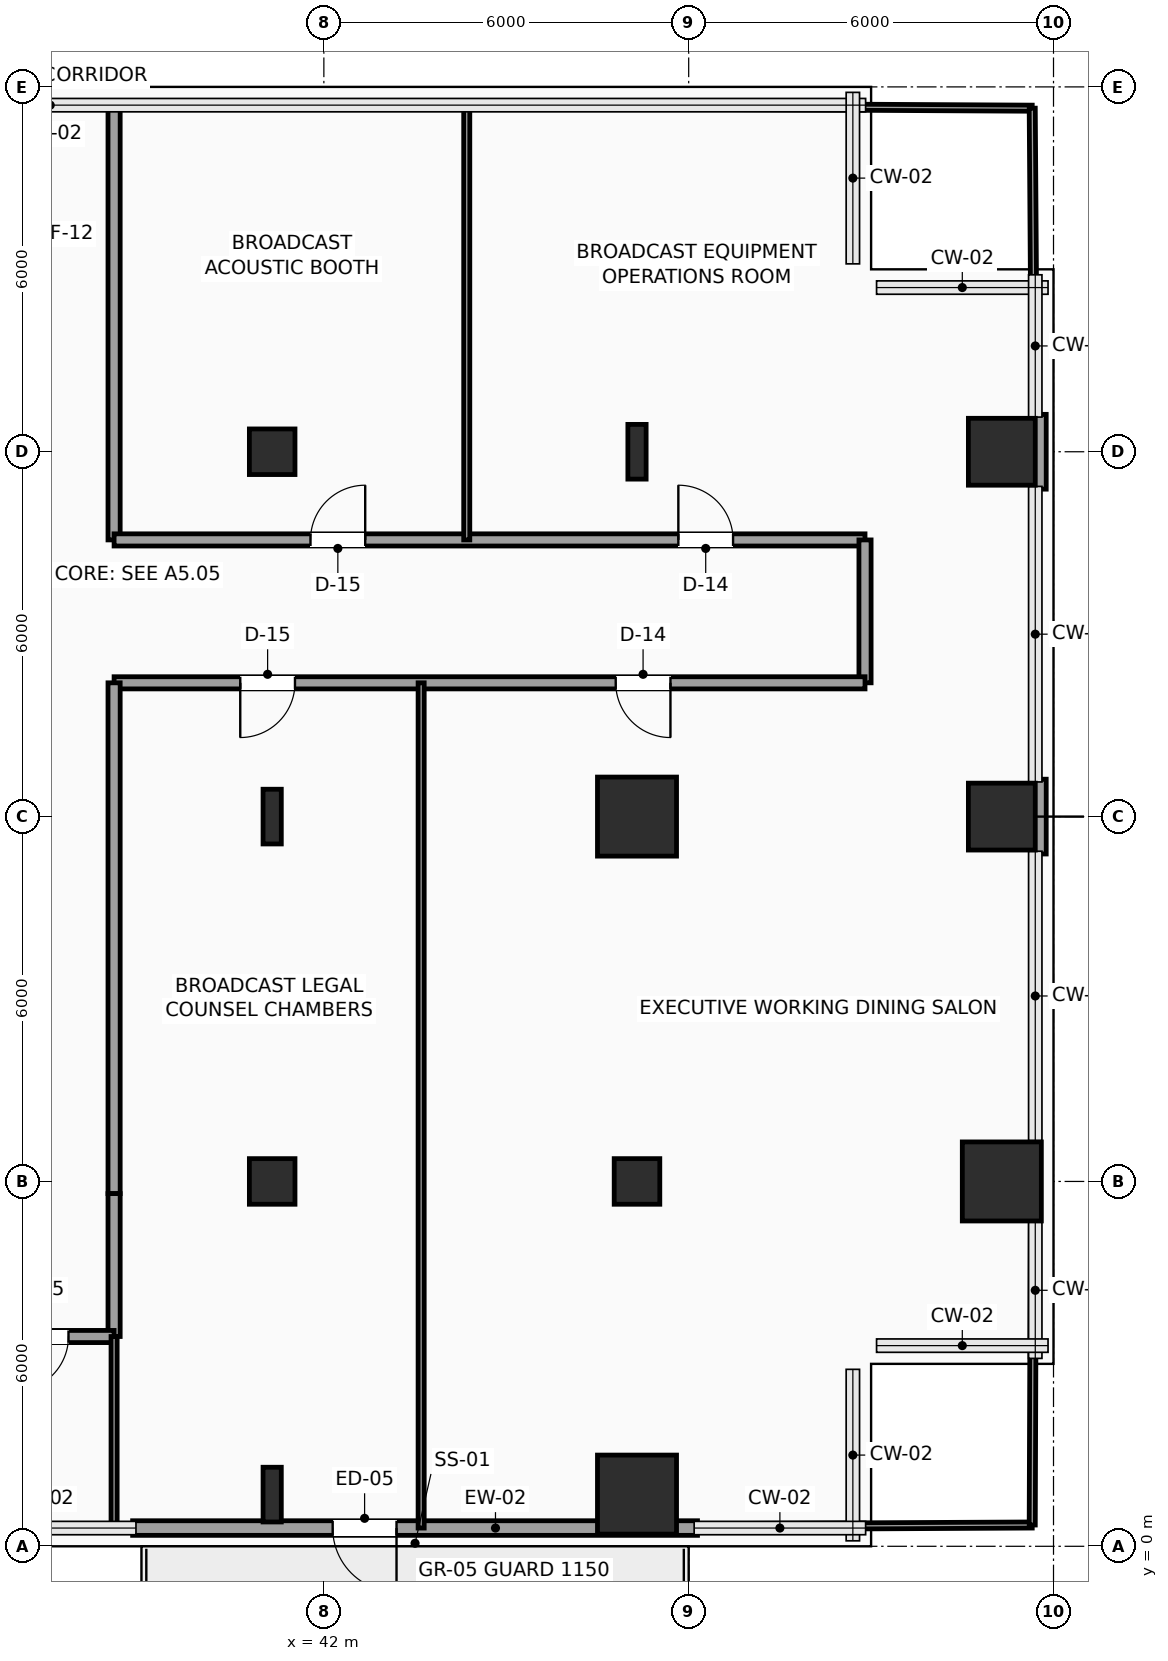
"""IFC4 building model, lengths in metres.
Left out: names, types, materials, properties, quantities, classifications, styles, units other than length and angle.
Written with IfcOpenShell. Run it as: python <this file> out.ifc"""

import sys

from ifc_helpers import new_model, si_unit, direction, frame, frame_2d, origin, origin_2d, place, context, subcontext, project, spatial, rectangle, hollow_rectangle, i_section, extrude, element, fill, save


model = new_model("IFC4")
c1 = context("Model", 3, precision=1e-05, world=origin(), true_north=direction((0.0, 1.0)))
c2 = subcontext(c1, "Body", "Model", "MODEL_VIEW")
j1 = project(units=[si_unit("LENGTHUNIT", "METRE"), si_unit("PLANEANGLEUNIT", "RADIAN")], contexts=[c1])
p1 = place(None, origin())
s1 = spatial("IfcSite", under=j1, at=p1, CompositionType="ELEMENT")
p2 = place(p1, origin())
s2 = spatial("IfcBuilding", under=s1, at=p2, CompositionType="ELEMENT")
p3 = place(p2, frame((0.0, 0.0, 90.9)))
s3 = spatial("IfcBuildingStorey", under=s2, at=p3, CompositionType="ELEMENT", Elevation=90.9)
p4 = place(p3, frame((41.15, 0.85, 0.0), z_axis=(0.0, 0.0, 1.0), x_axis=(1.0, 0.0, 0.0)))
e1 = element("IfcColumn", 1, at=p4, inside=s3, PredefinedType="COLUMN", context=c2, shape_type="SweptSolid", body=[
    extrude(i_section(OverallWidth=0.3, OverallDepth=0.9, WebThickness=0.019, FlangeThickness=0.035, FilletRadius=0.03, at=origin_2d()), origin(), (0.0, 0.0, 1.0), 3.9),
])
p5 = place(p3, frame((41.15, 6.0, 0.0), z_axis=(0.0, 0.0, 1.0), x_axis=(1.0, 0.0, 0.0)))
e2 = element("IfcColumn", 2, at=p5, inside=s3, PredefinedType="COLUMN", context=c2, shape_type="SweptSolid", body=[
    extrude(hollow_rectangle(XDim=0.75, YDim=0.75, WallThickness=0.035, InnerFilletRadius=0.035, OuterFilletRadius=0.05, at=origin_2d()), origin(), (0.0, 0.0, 1.0), 3.9),
])
p6 = place(p3, frame((41.15, 12.0, 0.0), z_axis=(0.0, 0.0, 1.0), x_axis=(1.0, 0.0, 0.0)))
e3 = element("IfcColumn", 3, at=p6, inside=s3, PredefinedType="COLUMN", context=c2, shape_type="SweptSolid", body=[
    extrude(i_section(OverallWidth=0.3, OverallDepth=0.9, WebThickness=0.019, FlangeThickness=0.035, FilletRadius=0.03, at=origin_2d()), origin(), (0.0, 0.0, 1.0), 3.9),
])
p7 = place(p3, frame((41.15, 18.0, 0.0), z_axis=(0.0, 0.0, 1.0), x_axis=(1.0, 0.0, 0.0)))
e4 = element("IfcColumn", 4, at=p7, inside=s3, PredefinedType="COLUMN", context=c2, shape_type="SweptSolid", body=[
    extrude(hollow_rectangle(XDim=0.75, YDim=0.75, WallThickness=0.035, InnerFilletRadius=0.035, OuterFilletRadius=0.05, at=origin_2d()), origin(), (0.0, 0.0, 1.0), 3.9),
])
p8 = place(p3, frame((47.15, 0.85, 0.0), z_axis=(0.0, 0.0, 1.0), x_axis=(1.0, 0.0, 0.0)))
e5 = element("IfcColumn", 5, at=p8, inside=s3, PredefinedType="COLUMN", context=c2, shape_type="SweptSolid", body=[
    extrude(rectangle(XDim=1.3, YDim=1.3, at=origin_2d()), origin(), (0.0, 0.0, 1.0), 3.9),
])
p9 = place(p3, frame((47.15, 6.0, 0.0), z_axis=(0.0, 0.0, 1.0), x_axis=(1.0, 0.0, 0.0)))
e6 = element("IfcColumn", 6, at=p9, inside=s3, PredefinedType="COLUMN", context=c2, shape_type="SweptSolid", body=[
    extrude(hollow_rectangle(XDim=0.75, YDim=0.75, WallThickness=0.035, InnerFilletRadius=0.035, OuterFilletRadius=0.05, at=origin_2d()), origin(), (0.0, 0.0, 1.0), 3.9),
])
p10 = place(p3, frame((47.15, 12.0, 0.0), z_axis=(0.0, 0.0, 1.0), x_axis=(1.0, 0.0, 0.0)))
e7 = element("IfcColumn", 7, at=p10, inside=s3, PredefinedType="COLUMN", context=c2, shape_type="SweptSolid", body=[
    extrude(rectangle(XDim=1.3, YDim=1.3, at=origin_2d()), origin(), (0.0, 0.0, 1.0), 3.9),
])
p11 = place(p3, frame((47.15, 18.0, 0.0), z_axis=(0.0, 0.0, 1.0), x_axis=(1.0, 0.0, 0.0)))
e8 = element("IfcColumn", 8, at=p11, inside=s3, PredefinedType="COLUMN", context=c2, shape_type="SweptSolid", body=[
    extrude(i_section(OverallWidth=0.3, OverallDepth=0.9, WebThickness=0.019, FlangeThickness=0.035, FilletRadius=0.03, at=origin_2d()), origin(), (0.0, 0.0, 1.0), 3.9),
])
p12 = place(p3, frame((53.15, 6.0, 0.0), z_axis=(0.0, 0.0, 1.0), x_axis=(1.0, 0.0, 0.0)))
e9 = element("IfcColumn", 9, at=p12, inside=s3, PredefinedType="COLUMN", context=c2, shape_type="SweptSolid", body=[
    extrude(rectangle(XDim=1.3, YDim=1.3, at=origin_2d()), origin(), (0.0, 0.0, 1.0), 3.9),
])
for number, where, z_axis, x_axis in (
    (10, (53.15, 12.0, 0.0), (0.0, 0.0, 1.0), (1.0, 0.0, 0.0)),
    (11, (53.15, 18.0, 0.0), (0.0, 0.0, 1.0), (1.0, 0.0, 0.0)),
):
    element("IfcColumn", number, at=place(p3, frame(where, z_axis=z_axis, x_axis=x_axis)), inside=s3, PredefinedType="COLUMN", context=c2, shape_type="SweptSolid", body=[
        extrude(rectangle(XDim=1.1, YDim=1.1, at=origin_2d()), origin(), (0.0, 0.0, 1.0), 3.9),
    ])
p13 = place(p3, frame((48.145, 0.3, 0.0), z_axis=(0.0, 0.0, 1.0), x_axis=(-1.0, 0.0, 0.0)))
e12 = element("IfcWall", 12, at=p13, inside=s3, PredefinedType="SOLIDWALL", context=c2, shape_type="SweptSolid", body=[
    extrude(rectangle(XDim=9.29, YDim=0.24, at=frame_2d((4.645, 0.0))), origin(), (0.0, 0.0, 1.0), 3.575),
])
p14 = place(p13, frame((4.95, 0.0, 0.0)))
e13 = element("IfcOpeningElement", 13, at=p14, cuts=e12, PredefinedType="OPENING", context=c2, shape_type="SweptSolid", body=[
    extrude(rectangle(XDim=1.05, YDim=2.2, at=frame_2d((0.525, 1.1))), frame((0.0, 0.13, 0.0), z_axis=(0.0, -1.0, 0.0), x_axis=(1.0, 0.0, 0.0)), (0.0, 0.0, 1.0), 0.26),
])
for number, where, z_axis, x_axis in (
    (14, (53.76, 18.615, 0.0), (0.0, 0.0, 1.0), (0.0, -1.0, 0.0)),
    (15, (53.76, 12.615, 0.0), (0.0, 0.0, 1.0), (0.0, -1.0, 0.0)),
):
    element("IfcWall", number, at=place(p3, frame(where, z_axis=z_axis, x_axis=x_axis)), inside=s3, PredefinedType="SOLIDWALL", context=c2, shape_type="SweptSolid", body=[
        extrude(rectangle(XDim=1.23, YDim=0.24, at=frame_2d((0.615, 0.0))), origin(), (0.0, 0.0, 1.0), 3.575),
    ])
p15 = place(p3, frame((38.55, 23.7, 0.0), z_axis=(0.0, 0.0, 1.0), x_axis=(0.0, -1.0, 0.0)))
e16 = element("IfcWall", 16, at=p15, inside=s3, PredefinedType="SOLIDWALL", context=c2, shape_type="SweptSolid", body=[
    extrude(rectangle(XDim=7.15, YDim=0.2, at=frame_2d((3.575, 0.0))), origin(), (0.0, 0.0, 1.0), 3.575),
])
p16 = place(p3, frame((38.55, 16.55, 0.0), z_axis=(0.0, 0.0, 1.0), x_axis=(1.0, 0.0, 0.0)))
e17 = element("IfcWall", 17, at=p16, inside=s3, PredefinedType="SOLIDWALL", context=c2, shape_type="SweptSolid", body=[
    extrude(rectangle(XDim=12.35, YDim=0.2, at=frame_2d((6.175, 0.0))), origin(), (0.0, 0.0, 1.0), 3.575),
])
p17 = place(p16, frame((3.23, 0.0, 0.0)))
e18 = element("IfcOpeningElement", 18, at=p17, cuts=e17, PredefinedType="OPENING", context=c2, shape_type="SweptSolid", body=[
    extrude(rectangle(XDim=0.9, YDim=2.1, at=frame_2d((0.45, 1.05))), frame((0.0, 0.11, 0.0), z_axis=(0.0, -1.0, 0.0), x_axis=(1.0, 0.0, 0.0)), (0.0, 0.0, 1.0), 0.22),
])
p18 = place(p16, frame((9.28, 0.0, 0.0)))
e19 = element("IfcOpeningElement", 19, at=p18, cuts=e17, PredefinedType="OPENING", context=c2, shape_type="SweptSolid", body=[
    extrude(rectangle(XDim=0.9, YDim=2.1, at=frame_2d((0.45, 1.05))), frame((0.0, 0.11, 0.0), z_axis=(0.0, -1.0, 0.0), x_axis=(1.0, 0.0, 0.0)), (0.0, 0.0, 1.0), 0.22),
])
p19 = place(p3, frame((50.9, 16.55, 0.0), z_axis=(0.0, 0.0, 1.0), x_axis=(0.0, -1.0, 0.0)))
e20 = element("IfcWall", 20, at=p19, inside=s3, PredefinedType="SOLIDWALL", context=c2, shape_type="SweptSolid", body=[
    extrude(rectangle(XDim=2.35, YDim=0.2, at=frame_2d((1.175, 0.0))), origin(), (0.0, 0.0, 1.0), 3.575),
])
p20 = place(p3, frame((50.9, 14.2, 0.0), z_axis=(0.0, 0.0, 1.0), x_axis=(-1.0, 0.0, 0.0)))
e21 = element("IfcWall", 21, at=p20, inside=s3, PredefinedType="SOLIDWALL", context=c2, shape_type="SweptSolid", body=[
    extrude(rectangle(XDim=12.35, YDim=0.2, at=frame_2d((6.175, 0.0))), origin(), (0.0, 0.0, 1.0), 3.575),
])
p21 = place(p20, frame((9.375, 0.0, 0.0)))
e22 = element("IfcOpeningElement", 22, at=p21, cuts=e21, PredefinedType="OPENING", context=c2, shape_type="SweptSolid", body=[
    extrude(rectangle(XDim=0.9, YDim=2.1, at=frame_2d((0.45, 1.05))), frame((0.0, 0.11, 0.0), z_axis=(0.0, -1.0, 0.0), x_axis=(1.0, 0.0, 0.0)), (0.0, 0.0, 1.0), 0.22),
])
p22 = place(p20, frame((3.2, 0.0, 0.0)))
e23 = element("IfcOpeningElement", 23, at=p22, cuts=e21, PredefinedType="OPENING", context=c2, shape_type="SweptSolid", body=[
    extrude(rectangle(XDim=0.9, YDim=2.1, at=frame_2d((0.45, 1.05))), frame((0.0, 0.11, 0.0), z_axis=(0.0, -1.0, 0.0), x_axis=(1.0, 0.0, 0.0)), (0.0, 0.0, 1.0), 0.22),
])
p23 = place(p3, frame((38.55, 14.2, 0.0), z_axis=(0.0, 0.0, 1.0), x_axis=(0.0, -1.0, 0.0)))
e24 = element("IfcWall", 24, at=p23, inside=s3, PredefinedType="SOLIDWALL", context=c2, shape_type="SweptSolid", body=[
    extrude(rectangle(XDim=8.4, YDim=0.2, at=frame_2d((4.2, 0.0))), origin(), (0.0, 0.0, 1.0), 3.575),
])
p24 = place(p3, frame((38.55, 5.8, 0.0), z_axis=(0.0, 0.0, 1.0), x_axis=(0.0, -1.0, 0.0)))
e25 = element("IfcWall", 25, at=p24, inside=s3, PredefinedType="SOLIDWALL", context=c2, shape_type="SweptSolid", body=[
    extrude(rectangle(XDim=2.35, YDim=0.2, at=frame_2d((1.175, 0.0))), origin(), (0.0, 0.0, 1.0), 3.575),
])
p25 = place(p3, frame((38.55, 3.45, 0.0), z_axis=(0.0, 0.0, 1.0), x_axis=(-1.0, 0.0, 0.0)))
e26 = element("IfcWall", 26, at=p25, inside=s3, PredefinedType="SOLIDWALL", context=c2, shape_type="SweptSolid", body=[
    extrude(rectangle(XDim=2.4, YDim=0.2, at=frame_2d((1.2, 0.0))), origin(), (0.0, 0.0, 1.0), 3.067),
])
p26 = place(p25, frame((0.75, 0.0, 0.0)))
e27 = element("IfcOpeningElement", 27, at=p26, cuts=e26, PredefinedType="OPENING", context=c2, shape_type="SweptSolid", body=[
    extrude(rectangle(XDim=0.9, YDim=2.1, at=frame_2d((0.45, 1.05))), frame((0.0, 0.11, 0.0), z_axis=(0.0, -1.0, 0.0), x_axis=(1.0, 0.0, 0.0)), (0.0, 0.0, 1.0), 0.22),
])
p27 = place(p3, frame((43.6, 0.3, 0.0), z_axis=(0.0, 0.0, 1.0), x_axis=(0.0, 1.0, 0.0)))
e28 = element("IfcWall", 28, at=p27, inside=s3, PredefinedType="PARTITIONING", context=c2, shape_type="SweptSolid", body=[
    extrude(rectangle(XDim=13.9, YDim=0.1, at=frame_2d((6.95, 0.0))), origin(), (0.0, 0.0, 1.0), 3.575),
])
p28 = place(p3, frame((48.145, 0.323, 0.0), z_axis=(0.0, 0.0, 1.0), x_axis=(0.999987442515, 0.005011468024, 0.0)))
e29 = element("IfcWall", 29, at=p28, inside=s3, PredefinedType="PARTITIONING", context=c2, shape_type="SweptSolid", body=[
    extrude(rectangle(XDim=5.505, YDim=0.1, at=frame_2d((2.752, 0.0))), origin(), (0.0, 0.0, 1.0), 3.575),
])
p29 = place(p3, frame((53.65, 0.35, 0.0), z_axis=(0.0, 0.0, 1.0), x_axis=(0.003606251025, 0.999993497456, 0.0)))
e30 = element("IfcWall", 30, at=p29, inside=s3, PredefinedType="PARTITIONING", context=c2, shape_type="SweptSolid", body=[
    extrude(rectangle(XDim=11.035, YDim=0.1, at=frame_2d((5.518, 0.0))), origin(), (0.0, 0.0, 1.0), 3.575),
])
p30 = place(p3, frame((53.694, 12.615, 0.0), z_axis=(0.0, 0.0, 1.0), x_axis=(0.003542799701, 0.999993724265, 0.0)))
e31 = element("IfcWall", 31, at=p30, inside=s3, PredefinedType="PARTITIONING", context=c2, shape_type="SweptSolid", body=[
    extrude(rectangle(XDim=1.585, YDim=0.1, at=frame_2d((0.792, 0.0))), origin(), (0.0, 0.0, 1.0), 3.575),
])
p31 = place(p3, frame((44.35, 16.55, 0.0), z_axis=(0.0, 0.0, 1.0), x_axis=(0.0, 1.0, 0.0)))
e32 = element("IfcWall", 32, at=p31, inside=s3, PredefinedType="PARTITIONING", context=c2, shape_type="SweptSolid", body=[
    extrude(rectangle(XDim=7.15, YDim=0.1, at=frame_2d((3.575, 0.0))), origin(), (0.0, 0.0, 1.0), 3.575),
])
p32 = place(p3, frame((44.35, 23.7, 0.0), z_axis=(0.0, 0.0, 1.0), x_axis=(0.999985518927, -0.005381629512, 0.0)))
e33 = element("IfcWall", 33, at=p32, inside=s3, PredefinedType="PARTITIONING", context=c2, shape_type="SweptSolid", body=[
    extrude(rectangle(XDim=9.3, YDim=0.1, at=frame_2d((4.65, 0.0))), origin(), (0.0, 0.0, 1.0), 3.575),
])
p33 = place(p3, frame((53.7, 16.55, 0.0), z_axis=(0.0, 0.0, 1.0), x_axis=(-0.007017371073, 0.999975377948, 0.0)))
e34 = element("IfcWall", 34, at=p33, inside=s3, PredefinedType="PARTITIONING", context=c2, shape_type="SweptSolid", body=[
    extrude(rectangle(XDim=0.835, YDim=0.1, at=frame_2d((0.417, 0.0))), origin(), (0.0, 0.0, 1.0), 3.575),
])
p34 = place(p3, frame((53.686, 18.615, 0.0), z_axis=(0.0, 0.0, 1.0), x_axis=(-0.007079296972, 0.999974941463, 0.0)))
e35 = element("IfcWall", 35, at=p34, inside=s3, PredefinedType="PARTITIONING", context=c2, shape_type="SweptSolid", body=[
    extrude(rectangle(XDim=5.035, YDim=0.1, at=frame_2d((2.518, 0.0))), origin(), (0.0, 0.0, 1.0), 3.575),
])
p35 = place(p3, frame((38.55, 0.3, 0.0), z_axis=(0.0, 0.0, 1.0), x_axis=(0.0, 1.0, 0.0)))
e36 = element("IfcWall", 36, at=p35, inside=s3, PredefinedType="PARTITIONING", context=c2, shape_type="SweptSolid", body=[
    extrude(rectangle(XDim=3.15, YDim=0.1, at=frame_2d((1.575, 0.0))), origin(), (0.0, 0.0, 1.0), 3.575),
])
p36 = place(p14, origin())
e37 = element("IfcDoor", 37, at=p36, inside=s3, OperationType="SINGLE_SWING_LEFT", PredefinedType="DOOR", context=c2, shape_type="SweptSolid", body=[
    extrude(rectangle(XDim=1.05, YDim=2.2, at=frame_2d((0.525, 1.1))), frame((0.0, 0.025, 0.0), z_axis=(0.0, -1.0, 0.0), x_axis=(1.0, 0.0, 0.0)), (0.0, 0.0, 1.0), 0.05),
])
fill(e13, e37)
p37 = place(p17, origin())
e38 = element("IfcDoor", 38, at=p37, inside=s3, OperationType="SINGLE_SWING_RIGHT", PredefinedType="DOOR", context=c2, shape_type="SweptSolid", body=[
    extrude(rectangle(XDim=0.9, YDim=2.1, at=frame_2d((0.45, 1.05))), frame((0.0, 0.025, 0.0), z_axis=(0.0, -1.0, 0.0), x_axis=(1.0, 0.0, 0.0)), (0.0, 0.0, 1.0), 0.05),
])
fill(e18, e38)
p38 = place(p18, origin())
e39 = element("IfcDoor", 39, at=p38, inside=s3, OperationType="SINGLE_SWING_LEFT", PredefinedType="DOOR", context=c2, shape_type="SweptSolid", body=[
    extrude(rectangle(XDim=0.9, YDim=2.1, at=frame_2d((0.45, 1.05))), frame((0.0, 0.025, 0.0), z_axis=(0.0, -1.0, 0.0), x_axis=(1.0, 0.0, 0.0)), (0.0, 0.0, 1.0), 0.05),
])
fill(e19, e39)
p39 = place(p21, origin())
e40 = element("IfcDoor", 40, at=p39, inside=s3, OperationType="SINGLE_SWING_RIGHT", PredefinedType="DOOR", context=c2, shape_type="SweptSolid", body=[
    extrude(rectangle(XDim=0.9, YDim=2.1, at=frame_2d((0.45, 1.05))), frame((0.0, 0.025, 0.0), z_axis=(0.0, -1.0, 0.0), x_axis=(1.0, 0.0, 0.0)), (0.0, 0.0, 1.0), 0.05),
])
fill(e22, e40)
p40 = place(p22, origin())
e41 = element("IfcDoor", 41, at=p40, inside=s3, OperationType="SINGLE_SWING_LEFT", PredefinedType="DOOR", context=c2, shape_type="SweptSolid", body=[
    extrude(rectangle(XDim=0.9, YDim=2.1, at=frame_2d((0.45, 1.05))), frame((0.0, 0.025, 0.0), z_axis=(0.0, -1.0, 0.0), x_axis=(1.0, 0.0, 0.0)), (0.0, 0.0, 1.0), 0.05),
])
fill(e23, e41)
p41 = place(p26, origin())
e42 = element("IfcDoor", 42, at=p41, inside=s3, OperationType="SINGLE_SWING_RIGHT", PredefinedType="DOOR", context=c2, shape_type="SweptSolid", body=[
    extrude(rectangle(XDim=0.9, YDim=2.1, at=frame_2d((0.45, 1.05))), frame((0.0, 0.025, 0.0), z_axis=(0.0, -1.0, 0.0), x_axis=(1.0, 0.0, 0.0)), (0.0, 0.0, 1.0), 0.05),
])
fill(e27, e42)
save(model, sys.argv[1])
